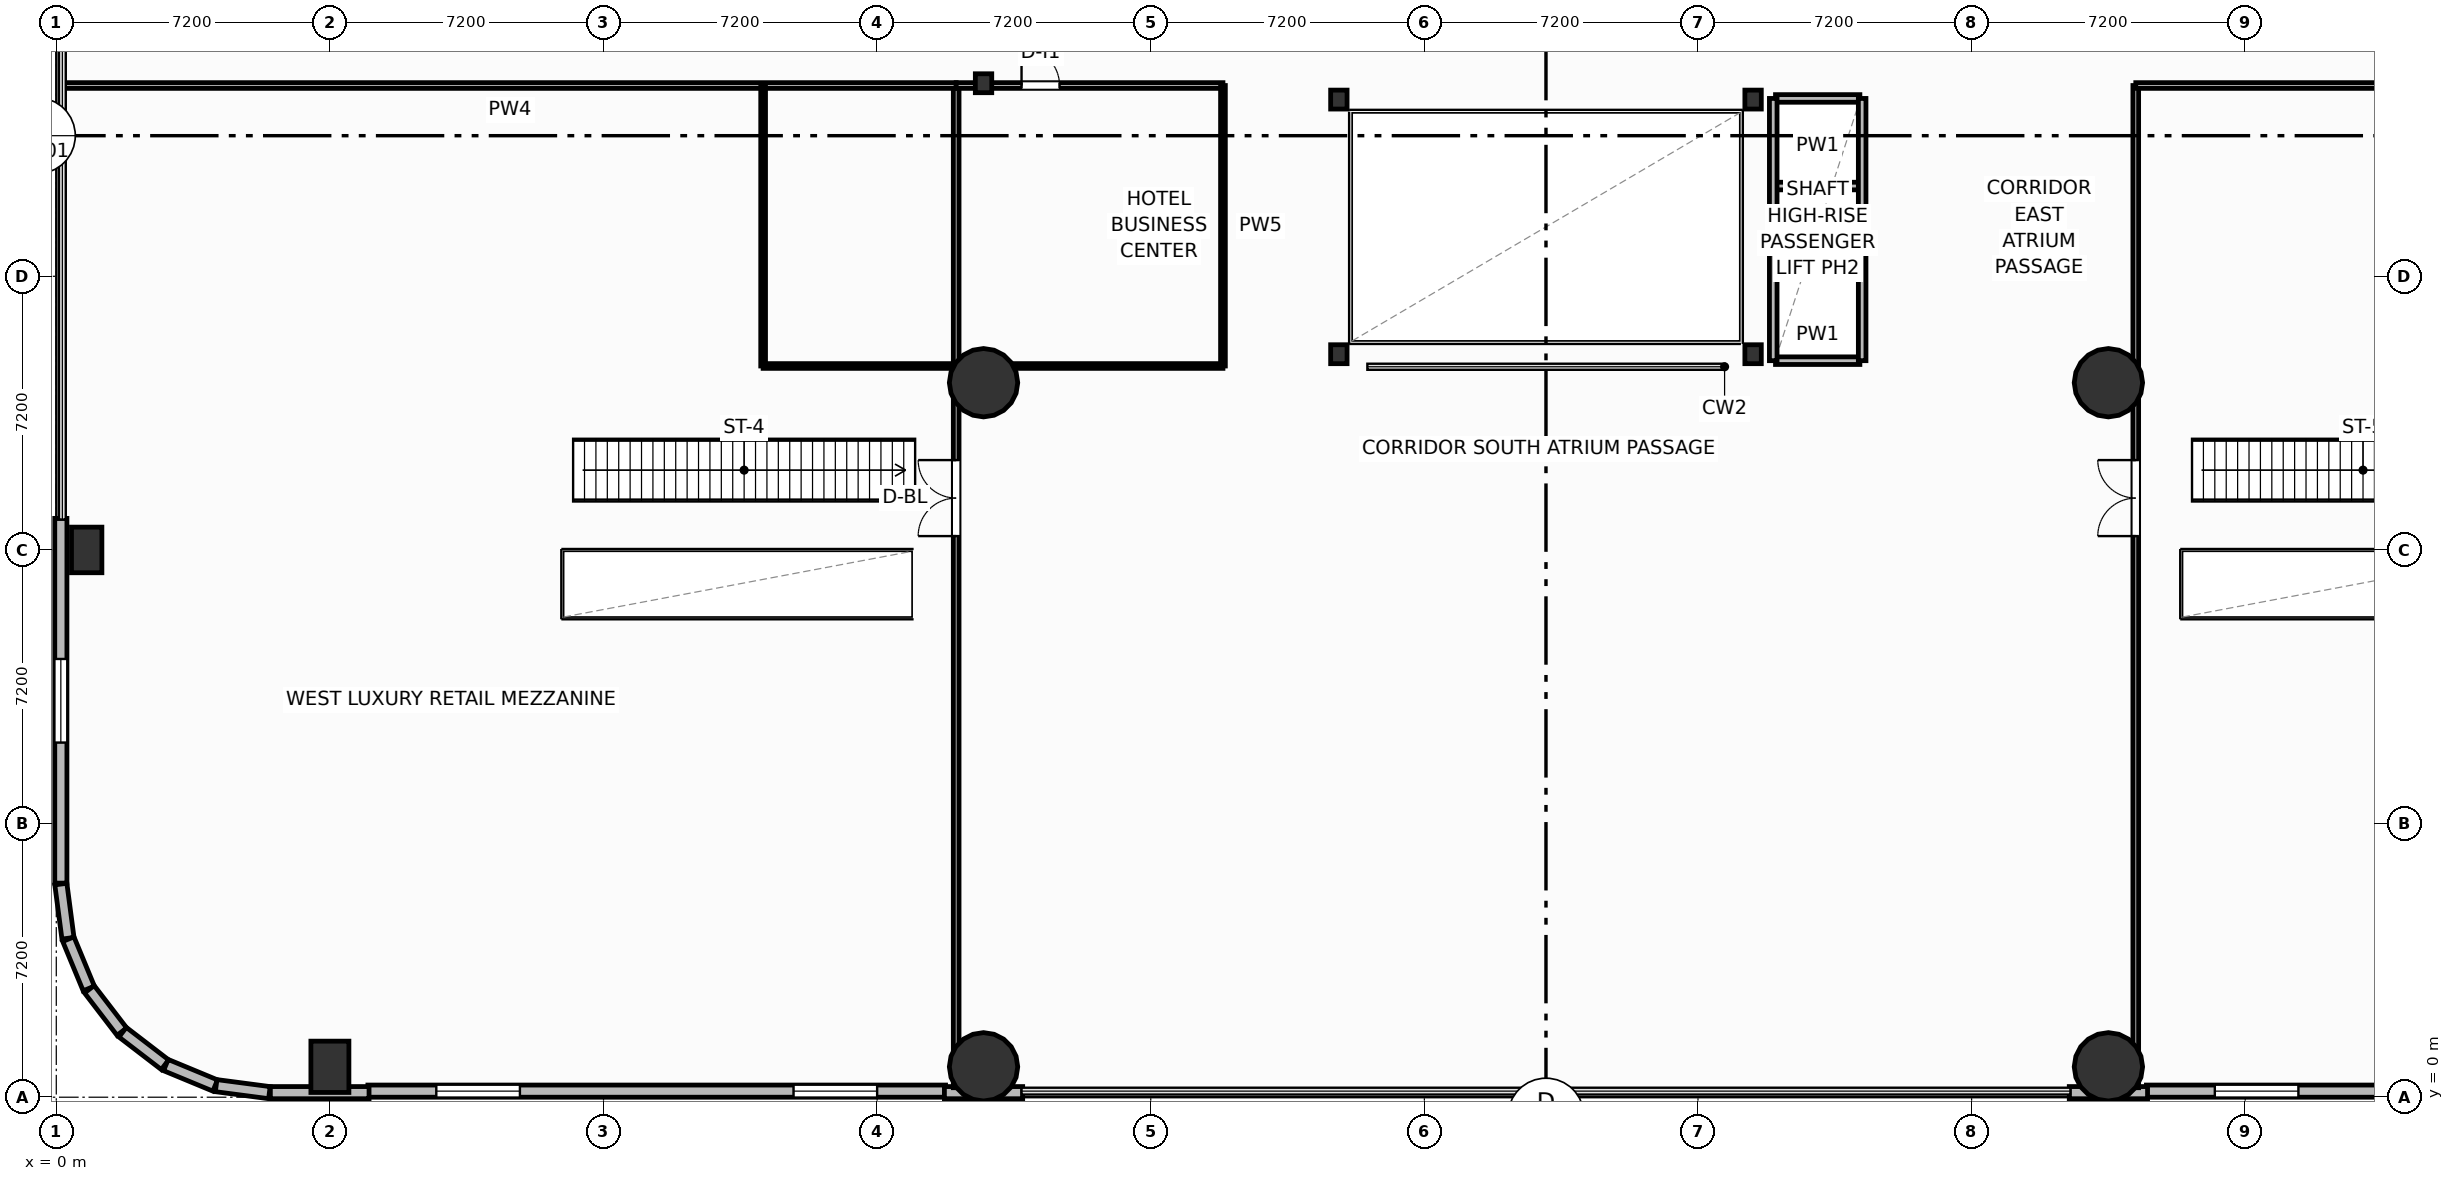
"""IFC4 building model, lengths in metres.
Left out: names, types, materials, properties, quantities, classifications, styles, units other than length and angle.
Written with IfcOpenShell. Run it as: python <this file> out.ifc"""

import sys

from ifc_helpers import new_model, si_unit, direction, frame, frame_2d, origin, origin_2d, place, context, subcontext, project, spatial, rectangle, circle, i_section, extrude, element, fill, save


model = new_model("IFC4")
c1 = context("Model", 3, precision=1e-05, world=origin(), true_north=direction((0.0, 1.0)))
c2 = subcontext(c1, "Body", "Model", "MODEL_VIEW")
j1 = project(units=[si_unit("LENGTHUNIT", "METRE"), si_unit("PLANEANGLEUNIT", "RADIAN")], contexts=[c1])
p1 = place(None, origin())
s1 = spatial("IfcSite", under=j1, at=p1, CompositionType="ELEMENT")
p2 = place(p1, origin())
s2 = spatial("IfcBuilding", under=s1, at=p2, CompositionType="ELEMENT")
p3 = place(p2, frame((0.0, 0.0, 5.4)))
s3 = spatial("IfcBuildingStorey", under=s2, at=p3, CompositionType="ELEMENT", Elevation=5.4)
for number, where, z_axis, x_axis in (
    (1, (33.75, 19.55, 0.0), (0.0, 0.0, 1.0), (1.0, 0.0, 0.0)),
    (2, (44.65, 19.55, 0.0), (0.0, 0.0, 1.0), (1.0, 0.0, 0.0)),
    (3, (33.75, 26.25, 0.0), (0.0, 0.0, 1.0), (1.0, 0.0, 0.0)),
    (4, (44.65, 26.25, 0.0), (0.0, 0.0, 1.0), (1.0, 0.0, 0.0)),
    (5, (24.4, 26.68, 0.0), (0.0, 0.0, 1.0), (1.0, 0.0, 0.0)),
):
    element("IfcColumn", number, at=place(p3, frame(where, z_axis=z_axis, x_axis=x_axis)), inside=s3, PredefinedType="COLUMN", context=c2, shape_type="SweptSolid", body=[
        extrude(i_section(OverallWidth=0.432, OverallDepth=0.498, WebThickness=0.056, FlangeThickness=0.089, FilletRadius=0.025, at=origin_2d()), origin(), (0.0, 0.0, 1.0), 5.4),
    ])
p4 = place(p3, frame((7.2, 0.8, 0.0), z_axis=(0.0, 0.0, 1.0), x_axis=(1.0, 0.0, 0.0)))
e6 = element("IfcColumn", 6, at=p4, inside=s3, PredefinedType="COLUMN", context=c2, shape_type="SweptSolid", body=[
    extrude(rectangle(XDim=1.0, YDim=1.35, at=origin_2d()), origin(), (0.0, 0.0, 1.0), 5.4),
])
for number, where, z_axis, x_axis in (
    (7, (24.4, 0.8, 0.0), (0.0, 0.0, 1.0), (1.0, 0.0, 0.0)),
    (8, (54.0, 0.8, 0.0), (0.0, 0.0, 1.0), (1.0, 0.0, 0.0)),
    (9, (24.4, 18.8, 0.0), (0.0, 0.0, 1.0), (1.0, 0.0, 0.0)),
    (10, (54.0, 18.8, 0.0), (0.0, 0.0, 1.0), (1.0, 0.0, 0.0)),
):
    element("IfcColumn", number, at=place(p3, frame(where, z_axis=z_axis, x_axis=x_axis)), inside=s3, PredefinedType="COLUMN", context=c2, shape_type="SweptSolid", body=[
        extrude(circle(Radius=0.9, at=origin_2d()), origin(), (0.0, 0.0, 1.0), 5.4),
    ])
p5 = place(p3, frame((0.8, 14.4, 0.0), z_axis=(0.0, 0.0, 1.0), x_axis=(1.0, 0.0, 0.0)))
e11 = element("IfcColumn", 11, at=p5, inside=s3, PredefinedType="PILASTER", context=c2, shape_type="SweptSolid", body=[
    extrude(rectangle(XDim=0.8, YDim=1.2, at=origin_2d()), origin(), (0.0, 0.0, 1.0), 5.4),
])
p6 = place(p3, frame((23.4, 0.16, 0.0), z_axis=(0.0, 0.0, 1.0), x_axis=(-1.0, 0.0, 0.0)))
e12 = element("IfcWall", 12, at=p6, inside=s3, PredefinedType="SOLIDWALL", context=c2, shape_type="SweptSolid", body=[
    extrude(rectangle(XDim=15.2, YDim=0.32, at=frame_2d((7.6, 0.0))), origin(), (0.0, 0.0, 1.0), 4.07),
])
p7 = place(p6, frame((1.8, 0.0, 0.8)))
e13 = element("IfcOpeningElement", 13, at=p7, cuts=e12, PredefinedType="OPENING", context=c2, shape_type="SweptSolid", body=[
    extrude(rectangle(XDim=2.2, YDim=1.85, at=frame_2d((1.1, 0.925))), frame((0.0, 0.17, 0.0), z_axis=(0.0, -1.0, 0.0), x_axis=(1.0, 0.0, 0.0)), (0.0, 0.0, 1.0), 0.34),
])
p8 = place(p6, frame((11.2, 0.0, 0.8)))
e14 = element("IfcOpeningElement", 14, at=p8, cuts=e12, PredefinedType="OPENING", context=c2, shape_type="SweptSolid", body=[
    extrude(rectangle(XDim=2.2, YDim=1.85, at=frame_2d((1.1, 0.925))), frame((0.0, 0.17, 0.0), z_axis=(0.0, -1.0, 0.0), x_axis=(1.0, 0.0, 0.0)), (0.0, 0.0, 1.0), 0.34),
])
p9 = place(p3, frame((70.2, 0.16, 0.0), z_axis=(0.0, 0.0, 1.0), x_axis=(-1.0, 0.0, 0.0)))
e15 = element("IfcWall", 15, at=p9, inside=s3, PredefinedType="SOLIDWALL", context=c2, shape_type="SweptSolid", body=[
    extrude(rectangle(XDim=15.2, YDim=0.32, at=frame_2d((7.6, 0.0))), origin(), (0.0, 0.0, 1.0), 4.07),
])
p10 = place(p9, frame((1.8, 0.0, 0.8)))
e16 = element("IfcOpeningElement", 16, at=p10, cuts=e15, PredefinedType="OPENING", context=c2, shape_type="SweptSolid", body=[
    extrude(rectangle(XDim=2.2, YDim=1.85, at=frame_2d((1.1, 0.925))), frame((0.0, 0.17, 0.0), z_axis=(0.0, -1.0, 0.0), x_axis=(1.0, 0.0, 0.0)), (0.0, 0.0, 1.0), 0.34),
])
p11 = place(p9, frame((11.2, 0.0, 0.8)))
e17 = element("IfcOpeningElement", 17, at=p11, cuts=e15, PredefinedType="OPENING", context=c2, shape_type="SweptSolid", body=[
    extrude(rectangle(XDim=2.2, YDim=1.85, at=frame_2d((1.1, 0.925))), frame((0.0, 0.17, 0.0), z_axis=(0.0, -1.0, 0.0), x_axis=(1.0, 0.0, 0.0)), (0.0, 0.0, 1.0), 0.34),
])
p12 = place(p3, frame((0.12, 5.608, 0.0), z_axis=(0.0, 0.0, 1.0), x_axis=(0.130362303307, -0.991466423978, 0.0)))
e18 = element("IfcWall", 18, at=p12, inside=s3, PredefinedType="SOLIDWALL", context=c2, shape_type="SweptSolid", body=[
    extrude(rectangle(XDim=1.438, YDim=0.32, at=frame_2d((0.719, 0.0))), origin(), (0.0, 0.0, 1.0), 4.07),
])
p13 = place(p3, frame((0.317, 4.159, 0.0), z_axis=(0.0, 0.0, 1.0), x_axis=(0.382628033724, -0.923902477434, 0.0)))
e19 = element("IfcWall", 19, at=p13, inside=s3, PredefinedType="SOLIDWALL", context=c2, shape_type="SweptSolid", body=[
    extrude(rectangle(XDim=1.405, YDim=0.32, at=frame_2d((0.703, 0.0))), origin(), (0.0, 0.0, 1.0), 4.07),
])
p14 = place(p3, frame((0.87, 2.841, 0.0), z_axis=(0.0, 0.0, 1.0), x_axis=(0.60871962085, -0.79338541907, 0.0)))
e20 = element("IfcWall", 20, at=p14, inside=s3, PredefinedType="SOLIDWALL", context=c2, shape_type="SweptSolid", body=[
    extrude(rectangle(XDim=1.405, YDim=0.32, at=frame_2d((0.703, 0.0))), origin(), (0.0, 0.0, 1.0), 4.07),
])
for number, where, z_axis, x_axis in (
    (21, (1.746, 1.711, 0.0), (0.0, 0.0, 1.0), (0.793, -0.609, 0.0)),
    (22, (2.884, 0.846, 0.0), (0.0, 0.0, 1.0), (0.924, -0.383, 0.0)),
):
    element("IfcWall", number, at=place(p3, frame(where, z_axis=z_axis, x_axis=x_axis)), inside=s3, PredefinedType="SOLIDWALL", context=c2, shape_type="SweptSolid", body=[
        extrude(rectangle(XDim=1.406, YDim=0.32, at=frame_2d((0.703, 0.0))), origin(), (0.0, 0.0, 1.0), 4.07),
    ])
p15 = place(p3, frame((4.207, 0.304, 0.0), z_axis=(0.0, 0.0, 1.0), x_axis=(0.991457235349, -0.130432168094, 0.0)))
e23 = element("IfcWall", 23, at=p15, inside=s3, PredefinedType="SOLIDWALL", context=c2, shape_type="SweptSolid", body=[
    extrude(rectangle(XDim=1.413, YDim=0.32, at=frame_2d((0.707, 0.0))), origin(), (0.0, 0.0, 1.0), 4.07),
])
p16 = place(p3, frame((5.633, 0.12, 0.0), z_axis=(0.0, 0.0, 1.0), x_axis=(1.0, 0.0, 0.0)))
e24 = element("IfcWall", 24, at=p16, inside=s3, PredefinedType="SOLIDWALL", context=c2, shape_type="SweptSolid", body=[
    extrude(rectangle(XDim=2.597, YDim=0.32, at=frame_2d((1.299, 0.0))), origin(), (0.0, 0.0, 1.0), 4.07),
])
p17 = place(p3, frame((23.37, 0.12, 0.0), z_axis=(0.0, 0.0, 1.0), x_axis=(1.0, 0.0, 0.0)))
e25 = element("IfcWall", 25, at=p17, inside=s3, PredefinedType="SOLIDWALL", context=c2, shape_type="SweptSolid", body=[
    extrude(rectangle(XDim=2.06, YDim=0.32, at=frame_2d((1.03, 0.0))), origin(), (0.0, 0.0, 1.0), 4.07),
])
p18 = place(p3, frame((52.97, 0.12, 0.0), z_axis=(0.0, 0.0, 1.0), x_axis=(1.0, 0.0, 0.0)))
e26 = element("IfcWall", 26, at=p18, inside=s3, PredefinedType="SOLIDWALL", context=c2, shape_type="SweptSolid", body=[
    extrude(rectangle(XDim=2.06, YDim=0.32, at=frame_2d((1.03, 0.0))), origin(), (0.0, 0.0, 1.0), 4.07),
])
p19 = place(p3, frame((0.12, 15.23, 0.0), z_axis=(0.0, 0.0, 1.0), x_axis=(0.0, -1.0, 0.0)))
e27 = element("IfcWall", 27, at=p19, inside=s3, PredefinedType="SOLIDWALL", context=c2, shape_type="SweptSolid", body=[
    extrude(rectangle(XDim=9.597, YDim=0.32, at=frame_2d((4.799, 0.0))), origin(), (0.0, 0.0, 1.0), 4.07),
])
p20 = place(p19, frame((3.698, 0.0, 0.8)))
e28 = element("IfcOpeningElement", 28, at=p20, cuts=e27, PredefinedType="OPENING", context=c2, shape_type="SweptSolid", body=[
    extrude(rectangle(XDim=2.2, YDim=2.0, at=frame_2d((1.1, 1.0))), frame((0.0, 0.17, 0.0), z_axis=(0.0, -1.0, 0.0), x_axis=(1.0, 0.0, 0.0)), (0.0, 0.0, 1.0), 0.34),
])
p21 = place(p3, frame((23.68, 0.25, 0.0), z_axis=(0.0, 0.0, 1.0), x_axis=(0.0, 1.0, 0.0)))
e29 = element("IfcWall", 29, at=p21, inside=s3, PredefinedType="PARTITIONING", context=c2, shape_type="SweptSolid", body=[
    extrude(rectangle(XDim=26.37, YDim=0.15, at=frame_2d((13.185, 0.0))), origin(), (0.0, 0.0, 1.0), 5.12),
])
p22 = place(p21, frame((14.514, 0.0, 0.0)))
e30 = element("IfcOpeningElement", 30, at=p22, cuts=e29, PredefinedType="OPENING", context=c2, shape_type="SweptSolid", body=[
    extrude(rectangle(XDim=2.0, YDim=2.05, at=frame_2d((1.0, 1.025))), frame((0.0, 0.085, 0.0), z_axis=(0.0, -1.0, 0.0), x_axis=(1.0, 0.0, 0.0)), (0.0, 0.0, 1.0), 0.17),
])
p23 = place(p3, frame((54.72, 0.25, 0.0), z_axis=(0.0, 0.0, 1.0), x_axis=(0.0, 1.0, 0.0)))
e31 = element("IfcWall", 31, at=p23, inside=s3, PredefinedType="PARTITIONING", context=c2, shape_type="SweptSolid", body=[
    extrude(rectangle(XDim=26.37, YDim=0.15, at=frame_2d((13.185, 0.0))), origin(), (0.0, 0.0, 1.0), 5.12),
])
p24 = place(p23, frame((14.514, 0.0, 0.0)))
e32 = element("IfcOpeningElement", 32, at=p24, cuts=e31, PredefinedType="OPENING", context=c2, shape_type="SweptSolid", body=[
    extrude(rectangle(XDim=2.0, YDim=2.05, at=frame_2d((1.0, 1.025))), frame((0.0, 0.085, 0.0), z_axis=(0.0, -1.0, 0.0), x_axis=(1.0, 0.0, 0.0)), (0.0, 0.0, 1.0), 0.17),
])
for number, where, z_axis, x_axis in (
    (33, (0.2, 26.62, 0.0), (0.0, 0.0, 1.0), (1.0, 0.0, 0.0)),
    (34, (54.72, 26.62, 0.0), (0.0, 0.0, 1.0), (1.0, 0.0, 0.0)),
):
    element("IfcWall", number, at=place(p3, frame(where, z_axis=z_axis, x_axis=x_axis)), inside=s3, PredefinedType="PARTITIONING", context=c2, shape_type="SweptSolid", body=[
        extrude(rectangle(XDim=23.48, YDim=0.15, at=frame_2d((11.74, 0.0))), origin(), (0.0, 0.0, 1.0), 5.12),
    ])
p25 = place(p3, frame((23.68, 26.62, 0.0), z_axis=(0.0, 0.0, 1.0), x_axis=(1.0, 0.0, 0.0)))
e35 = element("IfcWall", 35, at=p25, inside=s3, PredefinedType="PARTITIONING", context=c2, shape_type="SweptSolid", body=[
    extrude(rectangle(XDim=7.02, YDim=0.15, at=frame_2d((3.51, 0.0))), origin(), (0.0, 0.0, 1.0), 4.332),
])
p26 = place(p25, frame((1.72, 0.0, 0.0)))
e36 = element("IfcOpeningElement", 36, at=p26, cuts=e35, PredefinedType="OPENING", context=c2, shape_type="SweptSolid", body=[
    extrude(rectangle(XDim=1.0, YDim=2.05, at=frame_2d((0.5, 1.025))), frame((0.0, 0.085, 0.0), z_axis=(0.0, -1.0, 0.0), x_axis=(1.0, 0.0, 0.0)), (0.0, 0.0, 1.0), 0.17),
])
p27 = place(p3, frame((30.7, 19.24, 0.0), z_axis=(0.0, 0.0, 1.0), x_axis=(0.0, 1.0, 0.0)))
e37 = element("IfcWall", 37, at=p27, inside=s3, PredefinedType="PARTITIONING", context=c2, shape_type="SweptSolid", body=[
    extrude(rectangle(XDim=7.38, YDim=0.125, at=frame_2d((3.69, 0.0))), origin(), (0.0, 0.0, 1.0), 5.12),
])
p28 = place(p3, frame((18.6, 19.24, 0.0), z_axis=(0.0, 0.0, 1.0), x_axis=(0.0, 1.0, 0.0)))
e38 = element("IfcWall", 38, at=p28, inside=s3, PredefinedType="PARTITIONING", context=c2, shape_type="SweptSolid", body=[
    extrude(rectangle(XDim=7.34, YDim=0.125, at=frame_2d((3.67, 0.0))), origin(), (0.0, 0.0, 1.0), 5.12),
])
p29 = place(p3, frame((18.6, 19.24, 0.0), z_axis=(0.0, 0.0, 1.0), x_axis=(1.0, 0.0, 0.0)))
e39 = element("IfcWall", 39, at=p29, inside=s3, PredefinedType="PARTITIONING", context=c2, shape_type="SweptSolid", body=[
    extrude(rectangle(XDim=12.1, YDim=0.125, at=frame_2d((6.05, 0.0))), origin(), (0.0, 0.0, 1.0), 4.332),
])
for number, where, z_axis, x_axis in (
    (40, (45.24, 21.675, 0.0), (0.0, 0.0, 1.0), (1.0, 0.0, 0.0)),
    (41, (45.24, 23.975, 0.0), (0.0, 0.0, 1.0), (1.0, 0.0, 0.0)),
):
    element("IfcWall", number, at=place(p3, frame(where, z_axis=z_axis, x_axis=x_axis)), inside=s3, PredefinedType="PARTITIONING", context=c2, shape_type="SweptSolid", body=[
        extrude(rectangle(XDim=2.22, YDim=0.2, at=frame_2d((1.11, 0.0))), origin(), (0.0, 0.0, 1.0), 5.12),
    ])
p30 = place(p3, frame((45.24, 19.38, 0.0), z_axis=(0.0, 0.0, 1.0), x_axis=(1.0, 0.0, 0.0)))
e42 = element("IfcWall", 42, at=p30, inside=s3, PredefinedType="PARTITIONING", context=c2, shape_type="SweptSolid", body=[
    extrude(rectangle(XDim=2.22, YDim=0.2, at=frame_2d((1.11, 0.0))), origin(), (0.0, 0.0, 1.0), 4.332),
])
p31 = place(p3, frame((45.24, 26.28, 0.0), z_axis=(0.0, 0.0, 1.0), x_axis=(1.0, 0.0, 0.0)))
e43 = element("IfcWall", 43, at=p31, inside=s3, PredefinedType="PARTITIONING", context=c2, shape_type="SweptSolid", body=[
    extrude(rectangle(XDim=2.22, YDim=0.2, at=frame_2d((1.11, 0.0))), origin(), (0.0, 0.0, 1.0), 5.12),
])
for number, where, z_axis, x_axis in (
    (44, (45.18, 19.38, 0.0), (0.0, 0.0, 1.0), (0.0, 1.0, 0.0)),
    (45, (47.52, 19.38, 0.0), (0.0, 0.0, 1.0), (0.0, 1.0, 0.0)),
):
    element("IfcWall", number, at=place(p3, frame(where, z_axis=z_axis, x_axis=x_axis)), inside=s3, PredefinedType="PARTITIONING", context=c2, shape_type="SweptSolid", body=[
        extrude(rectangle(XDim=6.9, YDim=0.2, at=frame_2d((3.45, 0.0))), origin(), (0.0, 0.0, 1.0), 5.12),
    ])
p32 = place(p7, origin())
e46 = element("IfcWindow", 46, at=p32, inside=s3, PartitioningType="SINGLE_PANEL", PredefinedType="WINDOW", context=c2, shape_type="SweptSolid", body=[
    extrude(rectangle(XDim=2.2, YDim=1.85, at=frame_2d((1.1, 0.925))), frame((0.0, 0.03, 0.0), z_axis=(0.0, -1.0, 0.0), x_axis=(1.0, 0.0, 0.0)), (0.0, 0.0, 1.0), 0.06),
])
fill(e13, e46)
p33 = place(p8, origin())
e47 = element("IfcWindow", 47, at=p33, inside=s3, PartitioningType="SINGLE_PANEL", PredefinedType="WINDOW", context=c2, shape_type="SweptSolid", body=[
    extrude(rectangle(XDim=2.2, YDim=1.85, at=frame_2d((1.1, 0.925))), frame((0.0, 0.03, 0.0), z_axis=(0.0, -1.0, 0.0), x_axis=(1.0, 0.0, 0.0)), (0.0, 0.0, 1.0), 0.06),
])
fill(e14, e47)
p34 = place(p11, origin())
e48 = element("IfcWindow", 48, at=p34, inside=s3, PartitioningType="SINGLE_PANEL", PredefinedType="WINDOW", context=c2, shape_type="SweptSolid", body=[
    extrude(rectangle(XDim=2.2, YDim=1.85, at=frame_2d((1.1, 0.925))), frame((0.0, 0.03, 0.0), z_axis=(0.0, -1.0, 0.0), x_axis=(1.0, 0.0, 0.0)), (0.0, 0.0, 1.0), 0.06),
])
fill(e17, e48)
p35 = place(p20, origin())
e49 = element("IfcWindow", 49, at=p35, inside=s3, PartitioningType="SINGLE_PANEL", PredefinedType="WINDOW", context=c2, shape_type="SweptSolid", body=[
    extrude(rectangle(XDim=2.2, YDim=2.0, at=frame_2d((1.1, 1.0))), frame((0.0, 0.03, 0.0), z_axis=(0.0, -1.0, 0.0), x_axis=(1.0, 0.0, 0.0)), (0.0, 0.0, 1.0), 0.06),
])
fill(e28, e49)
p36 = place(p22, origin())
e50 = element("IfcDoor", 50, at=p36, inside=s3, OperationType="DOUBLE_DOOR_SINGLE_SWING", PredefinedType="DOOR", context=c2, shape_type="SweptSolid", body=[
    extrude(rectangle(XDim=2.0, YDim=2.05, at=frame_2d((1.0, 1.025))), frame((0.0, 0.025, 0.0), z_axis=(0.0, -1.0, 0.0), x_axis=(1.0, 0.0, 0.0)), (0.0, 0.0, 1.0), 0.05),
])
fill(e30, e50)
p37 = place(p24, origin())
e51 = element("IfcDoor", 51, at=p37, inside=s3, OperationType="DOUBLE_DOOR_SINGLE_SWING", PredefinedType="DOOR", context=c2, shape_type="SweptSolid", body=[
    extrude(rectangle(XDim=2.0, YDim=2.05, at=frame_2d((1.0, 1.025))), frame((0.0, 0.025, 0.0), z_axis=(0.0, -1.0, 0.0), x_axis=(1.0, 0.0, 0.0)), (0.0, 0.0, 1.0), 0.05),
])
fill(e32, e51)
p38 = place(p26, origin())
e52 = element("IfcDoor", 52, at=p38, inside=s3, OperationType="SINGLE_SWING_LEFT", PredefinedType="DOOR", context=c2, shape_type="SweptSolid", body=[
    extrude(rectangle(XDim=1.0, YDim=2.05, at=frame_2d((0.5, 1.025))), frame((0.0, 0.025, 0.0), z_axis=(0.0, -1.0, 0.0), x_axis=(1.0, 0.0, 0.0)), (0.0, 0.0, 1.0), 0.05),
])
fill(e36, e52)
save(model, sys.argv[1])
